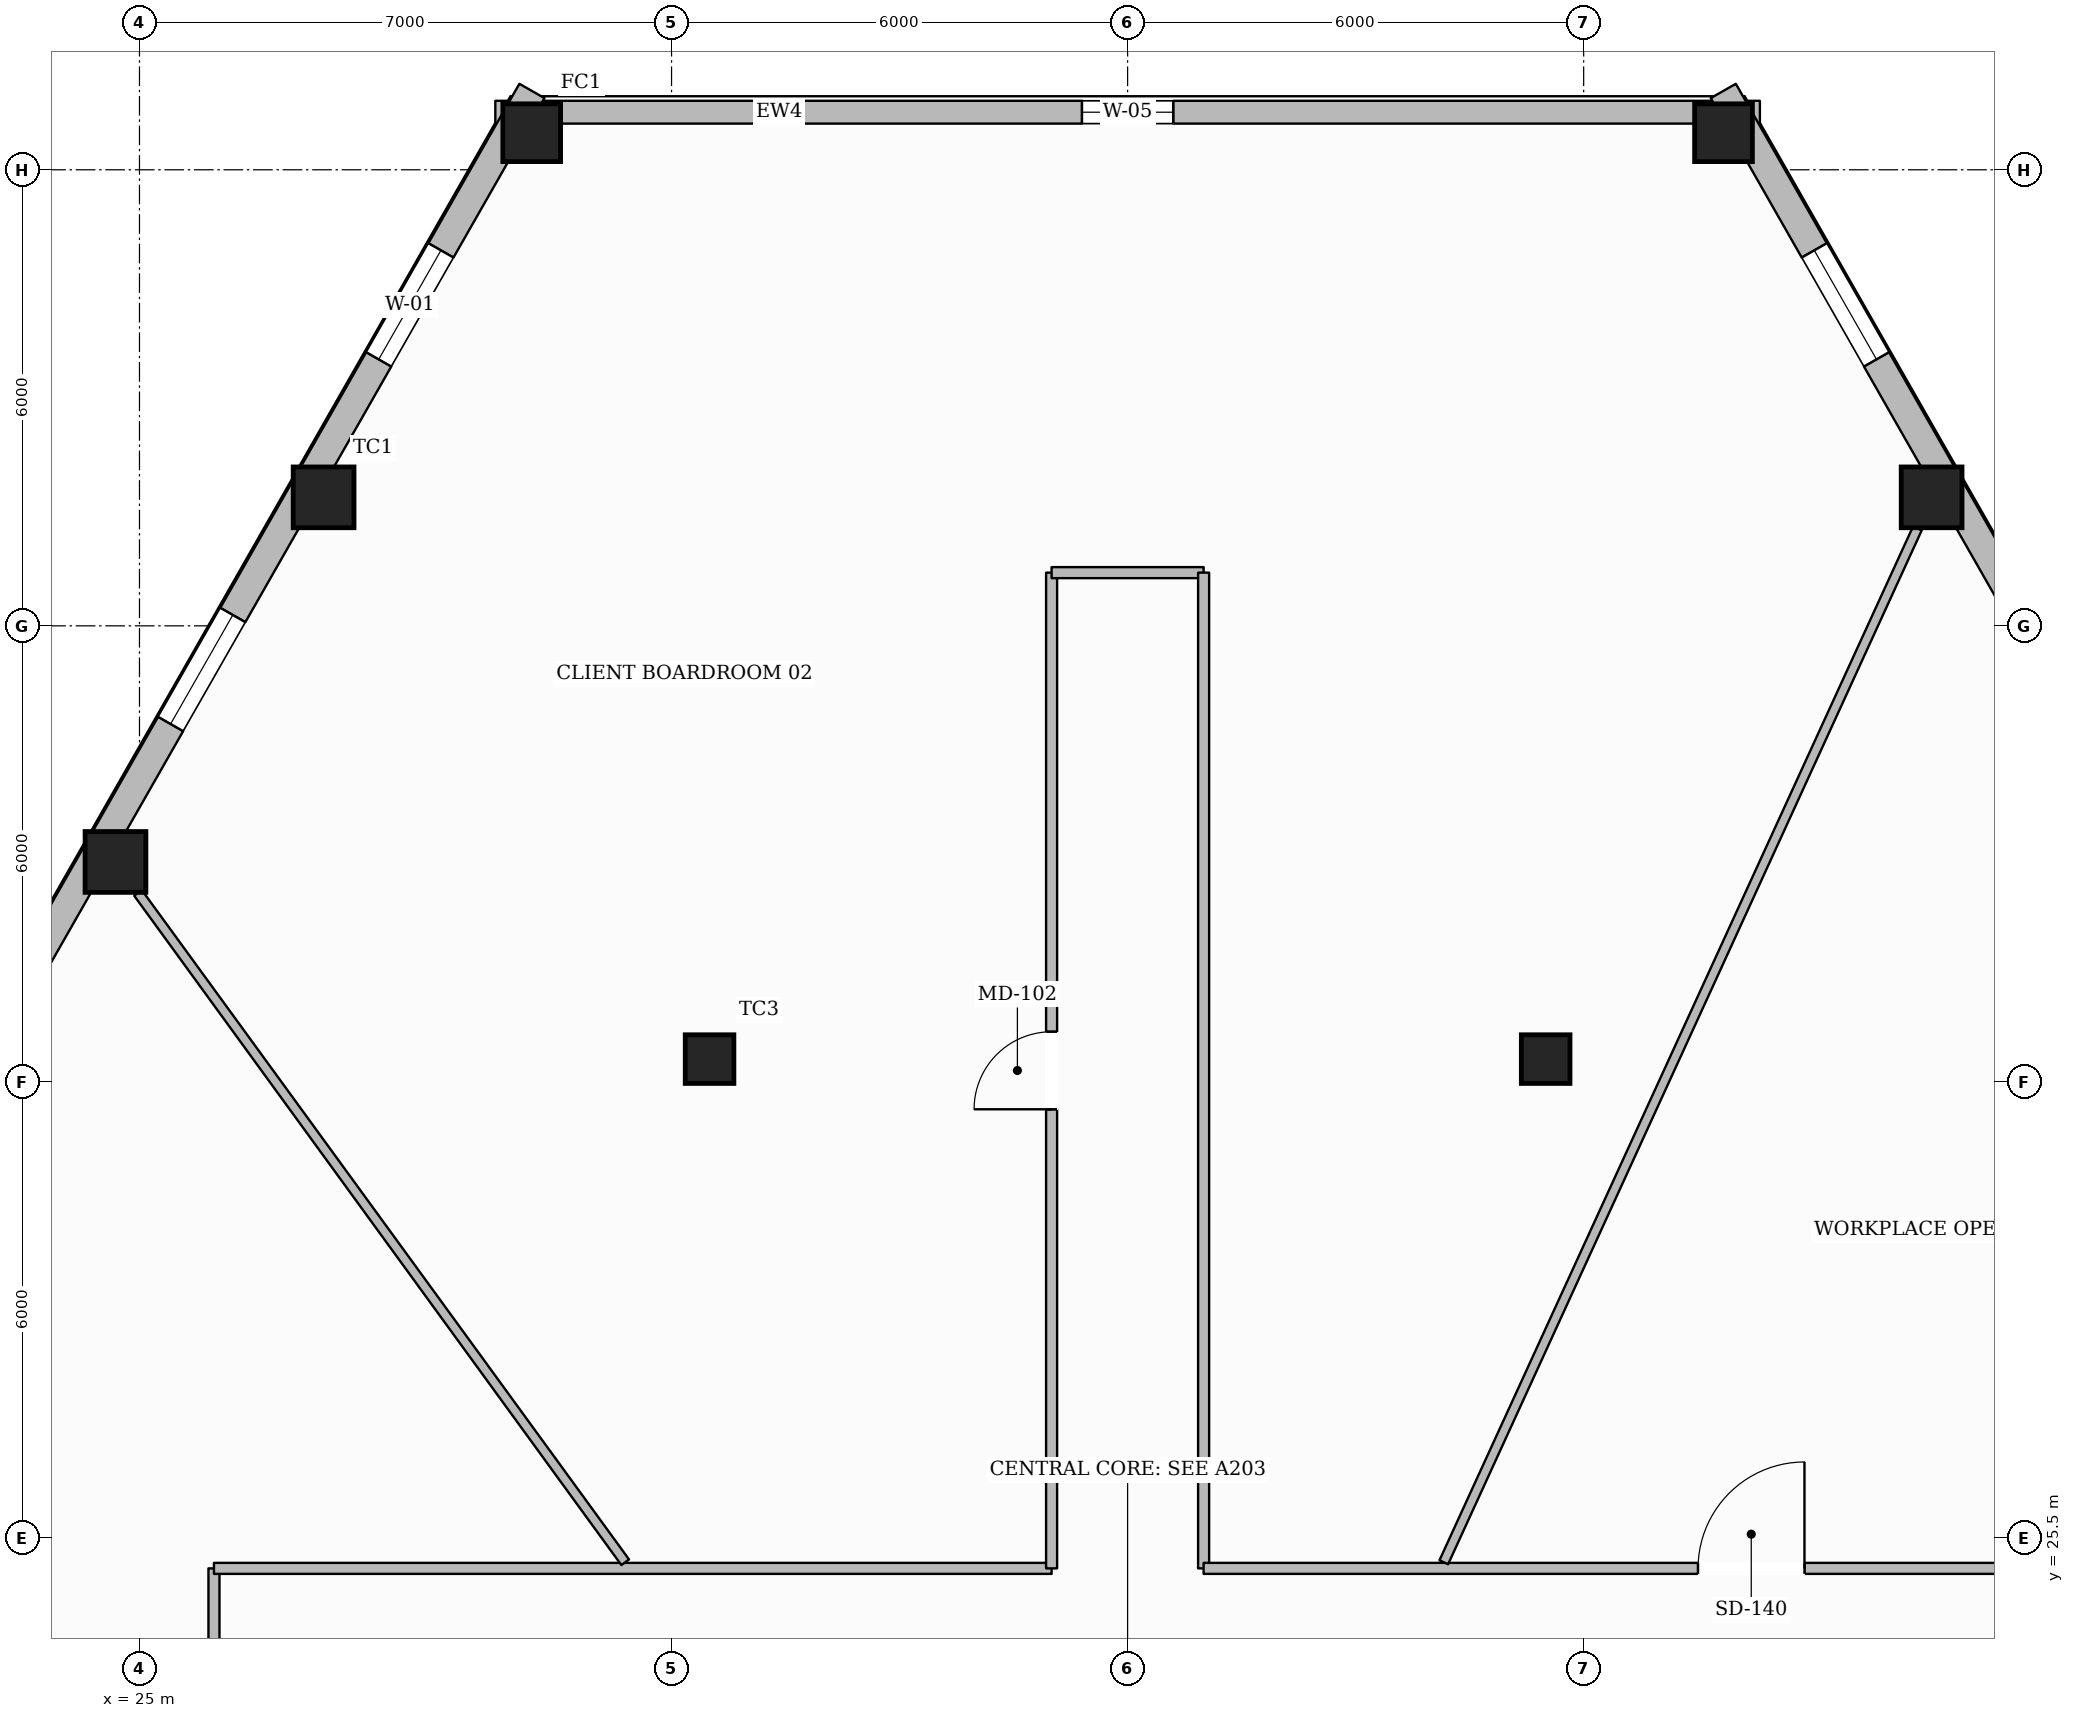
"""IFC4 building model, lengths in metres.
Left out: names, types, materials, properties, quantities, classifications, styles, units other than length and angle.
Written with IfcOpenShell. Run it as: python <this file> out.ifc"""

import sys

from ifc_helpers import new_model, si_unit, direction, frame, frame_2d, origin, origin_2d, place, context, subcontext, project, spatial, rectangle, hollow_rectangle, extrude, element, fill, save


model = new_model("IFC4")
c1 = context("Model", 3, precision=1e-05, world=origin(), true_north=direction((0.0, 1.0)))
c2 = subcontext(c1, "Body", "Model", "MODEL_VIEW")
j1 = project(units=[si_unit("LENGTHUNIT", "METRE"), si_unit("PLANEANGLEUNIT", "RADIAN")], contexts=[c1])
p1 = place(None, origin())
s1 = spatial("IfcSite", under=j1, at=p1, CompositionType="ELEMENT")
p2 = place(p1, origin())
s2 = spatial("IfcBuilding", under=s1, at=p2, CompositionType="ELEMENT")
p3 = place(p2, frame((0.0, 0.0, 25.25)))
s3 = spatial("IfcBuildingStorey", under=s2, at=p3, CompositionType="ELEMENT", Elevation=25.25)
p4 = place(p3, frame((30.16, 43.987, 0.0), z_axis=(0.0, 0.0, 1.0), x_axis=(1.0, 0.0, 0.0)))
e1 = element("IfcColumn", 1, at=p4, inside=s3, PredefinedType="COLUMN", context=c2, shape_type="SweptSolid", body=[
    extrude(hollow_rectangle(XDim=0.76, YDim=0.76, WallThickness=0.035, at=origin_2d()), origin(), (0.0, 0.0, 1.0), 3.59),
])
for number, where, z_axis, x_axis in (
    (2, (27.422, 39.19, 0.0), (0.0, 0.0, 1.0), (1.0, 0.0, 0.0)),
    (3, (24.684, 34.394, 0.0), (0.0, 0.0, 1.0), (1.0, 0.0, 0.0)),
    (4, (48.578, 39.19, 0.0), (0.0, 0.0, 1.0), (1.0, 0.0, 0.0)),
):
    element("IfcColumn", number, at=place(p3, frame(where, z_axis=z_axis, x_axis=x_axis)), inside=s3, PredefinedType="COLUMN", context=c2, shape_type="SweptSolid", body=[
        extrude(hollow_rectangle(XDim=0.8, YDim=0.8, WallThickness=0.036, at=origin_2d()), origin(), (0.0, 0.0, 1.0), 3.59),
    ])
p5 = place(p3, frame((45.84, 43.987, 0.0), z_axis=(0.0, 0.0, 1.0), x_axis=(1.0, 0.0, 0.0)))
e5 = element("IfcColumn", 5, at=p5, inside=s3, PredefinedType="COLUMN", context=c2, shape_type="SweptSolid", body=[
    extrude(hollow_rectangle(XDim=0.76, YDim=0.76, WallThickness=0.035, at=origin_2d()), origin(), (0.0, 0.0, 1.0), 3.59),
])
for number, where, z_axis, x_axis in (
    (6, (32.5, 31.8, 0.0), (0.0, 0.0, 1.0), (1.0, 0.0, 0.0)),
    (7, (43.5, 31.8, 0.0), (0.0, 0.0, 1.0), (1.0, 0.0, 0.0)),
):
    element("IfcColumn", number, at=place(p3, frame(where, z_axis=z_axis, x_axis=x_axis)), inside=s3, PredefinedType="COLUMN", context=c2, shape_type="SweptSolid", body=[
        extrude(hollow_rectangle(XDim=0.64, YDim=0.64, WallThickness=0.028, at=origin_2d()), origin(), (0.0, 0.0, 1.0), 3.59),
    ])
p6 = place(p3, frame((29.682, 44.257, 0.0), z_axis=(0.0, 0.0, 1.0), x_axis=(1.0, 0.0, 0.0)))
e8 = element("IfcWall", 8, at=p6, inside=s3, PredefinedType="STANDARD", context=c2, shape_type="SweptSolid", body=[
    extrude(rectangle(XDim=16.637, YDim=0.3, at=frame_2d((8.318, 0.0))), origin(), (0.0, 0.0, 1.0), 2.97),
])
p7 = place(p6, frame((7.719, 0.0, 0.65)))
e9 = element("IfcOpeningElement", 9, at=p7, cuts=e8, PredefinedType="OPENING", context=c2, shape_type="SweptSolid", body=[
    extrude(rectangle(XDim=1.2, YDim=1.7, at=frame_2d((0.6, 0.85))), frame((0.0, 0.16, 0.0), z_axis=(0.0, -1.0, 0.0), x_axis=(1.0, 0.0, 0.0)), (0.0, 0.0, 1.0), 0.32),
])
p8 = place(p3, frame((13.263, 14.928, 0.0), z_axis=(0.0, 0.0, 1.0), x_axis=(0.495711630902, 0.868487178367, 0.0)))
e10 = element("IfcWall", 10, at=p8, inside=s3, PredefinedType="STANDARD", context=c2, shape_type="SweptSolid", body=[
    extrude(rectangle(XDim=34.092, YDim=0.38, at=frame_2d((17.046, 0.0))), origin(), (0.0, 0.0, 1.0), 2.97),
])
p9 = place(p8, frame((30.027, 0.0, 0.65)))
e11 = element("IfcOpeningElement", 11, at=p9, cuts=e10, PredefinedType="OPENING", context=c2, shape_type="SweptSolid", body=[
    extrude(rectangle(XDim=1.65, YDim=1.75, at=frame_2d((0.825, 0.875))), frame((0.0, 0.2, 0.0), z_axis=(0.0, -1.0, 0.0), x_axis=(1.0, 0.0, 0.0)), (0.0, 0.0, 1.0), 0.4),
])
p10 = place(p8, frame((24.504, 0.0, 0.65)))
e12 = element("IfcOpeningElement", 12, at=p10, cuts=e10, PredefinedType="OPENING", context=c2, shape_type="SweptSolid", body=[
    extrude(rectangle(XDim=1.65, YDim=1.75, at=frame_2d((0.825, 0.875))), frame((0.0, 0.2, 0.0), z_axis=(0.0, -1.0, 0.0), x_axis=(1.0, 0.0, 0.0)), (0.0, 0.0, 1.0), 0.4),
])
p11 = place(p8, frame((13.457, 0.0, 0.65)))
e13 = element("IfcOpeningElement", 13, at=p11, cuts=e10, PredefinedType="OPENING", context=c2, shape_type="SweptSolid", body=[
    extrude(rectangle(XDim=1.65, YDim=1.75, at=frame_2d((0.825, 0.875))), frame((0.0, 0.2, 0.0), z_axis=(0.0, -1.0, 0.0), x_axis=(1.0, 0.0, 0.0)), (0.0, 0.0, 1.0), 0.4),
])
p12 = place(p8, frame((7.934, 0.0, 0.65)))
e14 = element("IfcOpeningElement", 14, at=p12, cuts=e10, PredefinedType="OPENING", context=c2, shape_type="SweptSolid", body=[
    extrude(rectangle(XDim=1.65, YDim=1.75, at=frame_2d((0.825, 0.875))), frame((0.0, 0.2, 0.0), z_axis=(0.0, -1.0, 0.0), x_axis=(1.0, 0.0, 0.0)), (0.0, 0.0, 1.0), 0.4),
])
p13 = place(p8, frame((2.411, 0.0, 0.65)))
e15 = element("IfcOpeningElement", 15, at=p13, cuts=e10, PredefinedType="OPENING", context=c2, shape_type="SweptSolid", body=[
    extrude(rectangle(XDim=1.65, YDim=1.75, at=frame_2d((0.825, 0.875))), frame((0.0, 0.2, 0.0), z_axis=(0.0, -1.0, 0.0), x_axis=(1.0, 0.0, 0.0)), (0.0, 0.0, 1.0), 0.4),
])
p14 = place(p3, frame((45.837, 44.537, 0.0), z_axis=(0.0, 0.0, 1.0), x_axis=(0.495711630902, -0.868487178367, 0.0)))
e16 = element("IfcWall", 16, at=p14, inside=s3, PredefinedType="STANDARD", context=c2, shape_type="SweptSolid", body=[
    extrude(rectangle(XDim=34.092, YDim=0.38, at=frame_2d((17.046, 0.0))), origin(), (0.0, 0.0, 1.0), 2.97),
])
p15 = place(p14, frame((30.031, 0.0, 0.65)))
e17 = element("IfcOpeningElement", 17, at=p15, cuts=e16, PredefinedType="OPENING", context=c2, shape_type="SweptSolid", body=[
    extrude(rectangle(XDim=1.65, YDim=1.75, at=frame_2d((0.825, 0.875))), frame((0.0, 0.2, 0.0), z_axis=(0.0, -1.0, 0.0), x_axis=(1.0, 0.0, 0.0)), (0.0, 0.0, 1.0), 0.4),
])
p16 = place(p14, frame((24.508, 0.0, 0.65)))
e18 = element("IfcOpeningElement", 18, at=p16, cuts=e16, PredefinedType="OPENING", context=c2, shape_type="SweptSolid", body=[
    extrude(rectangle(XDim=1.65, YDim=1.75, at=frame_2d((0.825, 0.875))), frame((0.0, 0.2, 0.0), z_axis=(0.0, -1.0, 0.0), x_axis=(1.0, 0.0, 0.0)), (0.0, 0.0, 1.0), 0.4),
])
p17 = place(p14, frame((13.462, 0.0, 0.65)))
e19 = element("IfcOpeningElement", 19, at=p17, cuts=e16, PredefinedType="OPENING", context=c2, shape_type="SweptSolid", body=[
    extrude(rectangle(XDim=1.65, YDim=1.75, at=frame_2d((0.825, 0.875))), frame((0.0, 0.2, 0.0), z_axis=(0.0, -1.0, 0.0), x_axis=(1.0, 0.0, 0.0)), (0.0, 0.0, 1.0), 0.4),
])
p18 = place(p14, frame((7.939, 0.0, 0.65)))
e20 = element("IfcOpeningElement", 20, at=p18, cuts=e16, PredefinedType="OPENING", context=c2, shape_type="SweptSolid", body=[
    extrude(rectangle(XDim=1.65, YDim=1.75, at=frame_2d((0.825, 0.875))), frame((0.0, 0.2, 0.0), z_axis=(0.0, -1.0, 0.0), x_axis=(1.0, 0.0, 0.0)), (0.0, 0.0, 1.0), 0.4),
])
p19 = place(p14, frame((2.415, 0.0, 0.65)))
e21 = element("IfcOpeningElement", 21, at=p19, cuts=e16, PredefinedType="OPENING", context=c2, shape_type="SweptSolid", body=[
    extrude(rectangle(XDim=1.65, YDim=1.75, at=frame_2d((0.825, 0.875))), frame((0.0, 0.2, 0.0), z_axis=(0.0, -1.0, 0.0), x_axis=(1.0, 0.0, 0.0)), (0.0, 0.0, 1.0), 0.4),
])
p20 = place(p3, frame((25.98, 9.1, 0.0), z_axis=(0.0, 0.0, 1.0), x_axis=(0.0, 1.0, 0.0)))
e22 = element("IfcWall", 22, at=p20, inside=s3, PredefinedType="PARTITIONING", context=c2, shape_type="SweptSolid", body=[
    extrude(rectangle(XDim=16.0, YDim=0.145, at=frame_2d((8.0, 0.0))), origin(), (0.0, 0.0, 1.0), 3.278),
])
p21 = place(p20, frame((10.491, 0.0, 0.0)))
e23 = element("IfcOpeningElement", 23, at=p21, cuts=e22, PredefinedType="OPENING", context=c2, shape_type="SweptSolid", body=[
    extrude(rectangle(XDim=1.4, YDim=2.2, at=frame_2d((0.7, 1.1))), frame((0.0, 0.083, 0.0), z_axis=(0.0, -1.0, 0.0), x_axis=(1.0, 0.0, 0.0)), (0.0, 0.0, 1.0), 0.165),
])
p22 = place(p20, frame((2.663, 0.0, 0.0)))
e24 = element("IfcOpeningElement", 24, at=p22, cuts=e22, PredefinedType="OPENING", context=c2, shape_type="SweptSolid", body=[
    extrude(rectangle(XDim=1.4, YDim=2.2, at=frame_2d((0.7, 1.1))), frame((0.0, 0.083, 0.0), z_axis=(0.0, -1.0, 0.0), x_axis=(1.0, 0.0, 0.0)), (0.0, 0.0, 1.0), 0.165),
])
p23 = place(p3, frame((25.98, 25.1, 0.0), z_axis=(0.0, 0.0, 1.0), x_axis=(1.0, 0.0, 0.0)))
e25 = element("IfcWall", 25, at=p23, inside=s3, PredefinedType="PARTITIONING", context=c2, shape_type="SweptSolid", body=[
    extrude(rectangle(XDim=11.02, YDim=0.145, at=frame_2d((5.51, 0.0))), origin(), (0.0, 0.0, 1.0), 3.59),
])
p24 = place(p3, frame((37.0, 25.1, 0.0), z_axis=(0.0, 0.0, 1.0), x_axis=(0.0, 1.0, 0.0)))
e26 = element("IfcWall", 26, at=p24, inside=s3, PredefinedType="PARTITIONING", context=c2, shape_type="SweptSolid", body=[
    extrude(rectangle(XDim=13.1, YDim=0.145, at=frame_2d((6.55, 0.0))), origin(), (0.0, 0.0, 1.0), 3.59),
])
p25 = place(p24, frame((6.04, 0.0, 0.0)))
e27 = element("IfcOpeningElement", 27, at=p25, cuts=e26, PredefinedType="OPENING", context=c2, shape_type="SweptSolid", body=[
    extrude(rectangle(XDim=1.02, YDim=2.15, at=frame_2d((0.51, 1.075))), frame((0.0, 0.083, 0.0), z_axis=(0.0, -1.0, 0.0), x_axis=(1.0, 0.0, 0.0)), (0.0, 0.0, 1.0), 0.165),
])
p26 = place(p3, frame((37.0, 38.2, 0.0), z_axis=(0.0, 0.0, 1.0), x_axis=(1.0, 0.0, 0.0)))
e28 = element("IfcWall", 28, at=p26, inside=s3, PredefinedType="PARTITIONING", context=c2, shape_type="SweptSolid", body=[
    extrude(rectangle(XDim=2.0, YDim=0.145, at=frame_2d((1.0, 0.0))), origin(), (0.0, 0.0, 1.0), 3.59),
])
p27 = place(p3, frame((39.0, 38.2, 0.0), z_axis=(0.0, 0.0, 1.0), x_axis=(0.0, -1.0, 0.0)))
e29 = element("IfcWall", 29, at=p27, inside=s3, PredefinedType="PARTITIONING", context=c2, shape_type="SweptSolid", body=[
    extrude(rectangle(XDim=13.1, YDim=0.145, at=frame_2d((6.55, 0.0))), origin(), (0.0, 0.0, 1.0), 3.59),
])
p28 = place(p3, frame((39.0, 25.1, 0.0), z_axis=(0.0, 0.0, 1.0), x_axis=(1.0, 0.0, 0.0)))
e30 = element("IfcWall", 30, at=p28, inside=s3, PredefinedType="PARTITIONING", context=c2, shape_type="SweptSolid", body=[
    extrude(rectangle(XDim=11.02, YDim=0.145, at=frame_2d((5.51, 0.0))), origin(), (0.0, 0.0, 1.0), 3.59),
])
p29 = place(p28, frame((6.505, 0.0, 0.0)))
e31 = element("IfcOpeningElement", 31, at=p29, cuts=e30, PredefinedType="OPENING", context=c2, shape_type="SweptSolid", body=[
    extrude(rectangle(XDim=1.4, YDim=2.2, at=frame_2d((0.7, 1.1))), frame((0.0, 0.083, 0.0), z_axis=(0.0, -1.0, 0.0), x_axis=(1.0, 0.0, 0.0)), (0.0, 0.0, 1.0), 0.165),
])
p30 = place(p3, frame((42.16, 25.18, 0.0), z_axis=(0.0, 0.0, 1.0), x_axis=(0.416471526835, 0.90914875974, 0.0)))
e32 = element("IfcWall", 32, at=p30, inside=s3, PredefinedType="PARTITIONING", context=c2, shape_type="SweptSolid", body=[
    extrude(rectangle(XDim=14.961, YDim=0.125, at=frame_2d((7.481, 0.0))), origin(), (0.0, 0.0, 1.0), 3.057),
])
p31 = place(p3, frame((31.39, 25.18, 0.0), z_axis=(0.0, 0.0, 1.0), x_axis=(-0.588482227792, 0.808510153043, 0.0)))
e33 = element("IfcWall", 33, at=p31, inside=s3, PredefinedType="PARTITIONING", context=c2, shape_type="SweptSolid", body=[
    extrude(rectangle(XDim=10.891, YDim=0.125, at=frame_2d((5.445, 0.0))), origin(), (0.0, 0.0, 1.0), 3.057),
])
p32 = place(p9, origin())
e34 = element("IfcWindow", 34, at=p32, inside=s3, PartitioningType="SINGLE_PANEL", PredefinedType="WINDOW", context=c2, shape_type="SweptSolid", body=[
    extrude(rectangle(XDim=1.65, YDim=1.75, at=frame_2d((0.825, 0.875))), frame((0.0, 0.03, 0.0), z_axis=(0.0, -1.0, 0.0), x_axis=(1.0, 0.0, 0.0)), (0.0, 0.0, 1.0), 0.06),
])
fill(e11, e34)
p33 = place(p10, origin())
e35 = element("IfcWindow", 35, at=p33, inside=s3, PartitioningType="SINGLE_PANEL", PredefinedType="WINDOW", context=c2, shape_type="SweptSolid", body=[
    extrude(rectangle(XDim=1.65, YDim=1.75, at=frame_2d((0.825, 0.875))), frame((0.0, 0.03, 0.0), z_axis=(0.0, -1.0, 0.0), x_axis=(1.0, 0.0, 0.0)), (0.0, 0.0, 1.0), 0.06),
])
fill(e12, e35)
p34 = place(p19, origin())
e36 = element("IfcWindow", 36, at=p34, inside=s3, PartitioningType="SINGLE_PANEL", PredefinedType="WINDOW", context=c2, shape_type="SweptSolid", body=[
    extrude(rectangle(XDim=1.65, YDim=1.75, at=frame_2d((0.825, 0.875))), frame((0.0, 0.03, 0.0), z_axis=(0.0, -1.0, 0.0), x_axis=(1.0, 0.0, 0.0)), (0.0, 0.0, 1.0), 0.06),
])
fill(e21, e36)
p35 = place(p7, origin())
e37 = element("IfcWindow", 37, at=p35, inside=s3, PartitioningType="SINGLE_PANEL", PredefinedType="WINDOW", context=c2, shape_type="SweptSolid", body=[
    extrude(rectangle(XDim=1.2, YDim=1.7, at=frame_2d((0.6, 0.85))), frame((0.0, 0.03, 0.0), z_axis=(0.0, -1.0, 0.0), x_axis=(1.0, 0.0, 0.0)), (0.0, 0.0, 1.0), 0.06),
])
fill(e9, e37)
p36 = place(p29, origin())
e38 = element("IfcDoor", 38, at=p36, inside=s3, OperationType="SINGLE_SWING_RIGHT", PredefinedType="DOOR", context=c2, shape_type="SweptSolid", body=[
    extrude(rectangle(XDim=1.4, YDim=2.2, at=frame_2d((0.7, 1.1))), frame((0.0, 0.025, 0.0), z_axis=(0.0, -1.0, 0.0), x_axis=(1.0, 0.0, 0.0)), (0.0, 0.0, 1.0), 0.05),
])
fill(e31, e38)
p37 = place(p25, origin())
e39 = element("IfcDoor", 39, at=p37, inside=s3, OperationType="SINGLE_SWING_LEFT", PredefinedType="DOOR", context=c2, shape_type="SweptSolid", body=[
    extrude(rectangle(XDim=1.02, YDim=2.15, at=frame_2d((0.51, 1.075))), frame((0.0, 0.025, 0.0), z_axis=(0.0, -1.0, 0.0), x_axis=(1.0, 0.0, 0.0)), (0.0, 0.0, 1.0), 0.05),
])
fill(e27, e39)
save(model, sys.argv[1])
